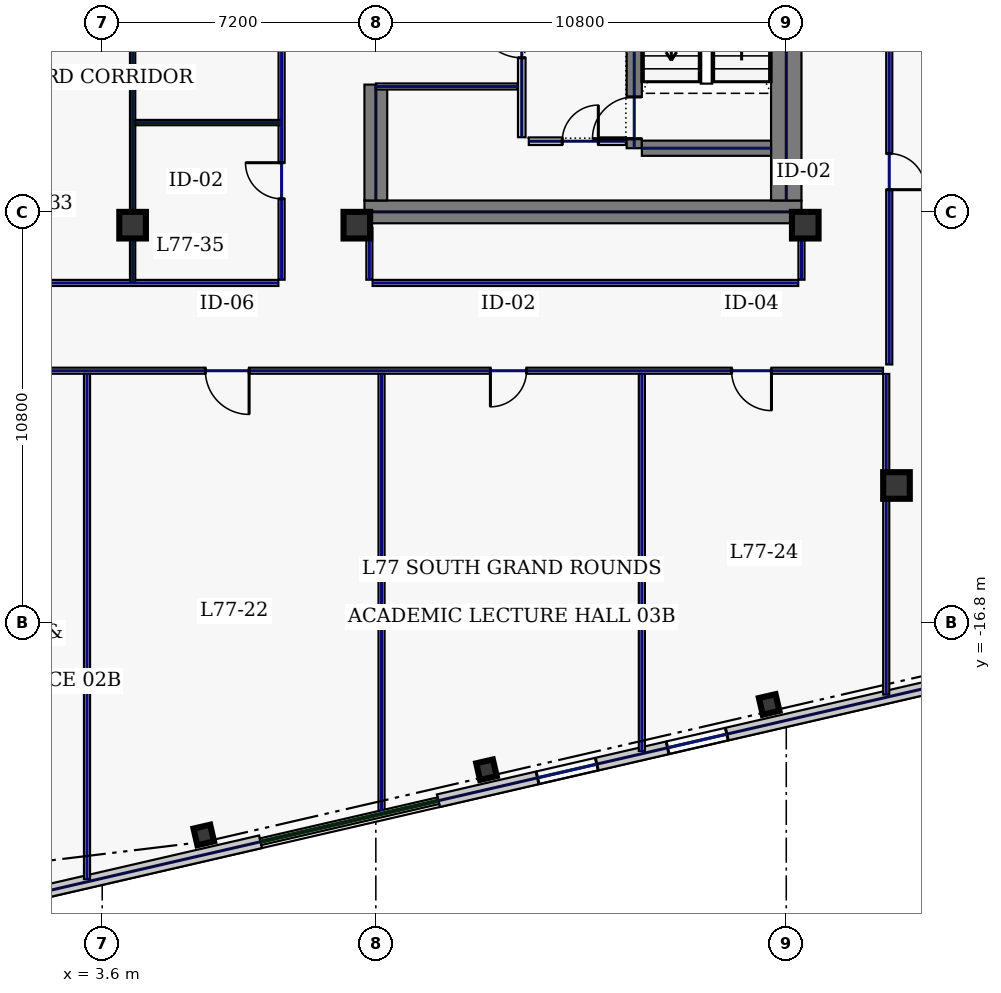
"""IFC4 building model, lengths in metres.
Left out: names, types, materials, properties, quantities, classifications, styles, units other than length and angle.
Written with IfcOpenShell. Run it as: python <this file> out.ifc"""

import sys

from ifc_helpers import new_model, si_unit, direction, frame, frame_2d, origin, origin_2d, place, context, subcontext, project, spatial, rectangle, hollow_rectangle, extrude, element, fill, save


model = new_model("IFC4")
c1 = context("Model", 3, precision=1e-05, world=origin(), true_north=direction((0.0, 1.0)))
c2 = subcontext(c1, "Body", "Model", "MODEL_VIEW")
j1 = project(units=[si_unit("LENGTHUNIT", "METRE"), si_unit("PLANEANGLEUNIT", "RADIAN")], contexts=[c1])
p1 = place(None, origin())
s1 = spatial("IfcSite", under=j1, at=p1, CompositionType="ELEMENT")
p2 = place(p1, origin())
s2 = spatial("IfcBuilding", under=s1, at=p2, CompositionType="ELEMENT")
p3 = place(p2, frame((0.0, 0.0, 329.0)))
s3 = spatial("IfcBuildingStorey", under=s2, at=p3, CompositionType="ELEMENT", Elevation=329.0)
p4 = place(p3, frame((10.5, -6.0, 0.0), z_axis=(0.0, 0.0, 1.0), x_axis=(1.0, 0.0, 0.0)))
e1 = element("IfcWall", 1, at=p4, inside=s3, PredefinedType="SHEAR", context=c2, shape_type="SweptSolid", body=[
    extrude(rectangle(XDim=11.5, YDim=0.6, at=frame_2d((5.75, 0.0))), origin(), (0.0, 0.0, 1.0), 3.68),
])
p5 = place(p3, frame((21.6, -5.7, 0.0), z_axis=(0.0, 0.0, 1.0), x_axis=(0.0, 1.0, 0.0)))
e2 = element("IfcWall", 2, at=p5, inside=s3, PredefinedType="SHEAR", context=c2, shape_type="SweptSolid", body=[
    extrude(rectangle(XDim=11.4, YDim=0.8, at=frame_2d((5.7, 0.0))), origin(), (0.0, 0.0, 1.0), 3.68),
])
p6 = place(p3, frame((10.8, -5.7, 0.0), z_axis=(0.0, 0.0, 1.0), x_axis=(0.0, 1.0, 0.0)))
e3 = element("IfcWall", 3, at=p6, inside=s3, PredefinedType="SHEAR", context=c2, shape_type="SweptSolid", body=[
    extrude(rectangle(XDim=3.05, YDim=0.6, at=frame_2d((1.525, 0.0))), origin(), (0.0, 0.0, 1.0), 3.68),
])
p7 = place(p3, frame((17.6, -4.325, 0.0), z_axis=(0.0, 0.0, 1.0), x_axis=(0.0, 1.0, 0.0)))
e4 = element("IfcWall", 4, at=p7, inside=s3, PredefinedType="SHEAR", context=c2, shape_type="SweptSolid", body=[
    extrude(rectangle(XDim=8.65, YDim=0.4, at=frame_2d((4.325, 0.0))), origin(), (0.0, 0.0, 1.0), 3.68),
])
p8 = place(p7, frame((0.25, 0.0, 0.0)))
e5 = element("IfcOpeningElement", 5, at=p8, cuts=e4, PredefinedType="OPENING", context=c2, shape_type="SweptSolid", body=[
    extrude(rectangle(XDim=1.1, YDim=2.2, at=frame_2d((0.55, 1.1))), frame((0.0, 0.21, 0.0), z_axis=(0.0, -1.0, 0.0), x_axis=(1.0, 0.0, 0.0)), (0.0, 0.0, 1.0), 0.42),
])
p9 = place(p3, frame((17.8, -4.325, 0.0), z_axis=(0.0, 0.0, 1.0), x_axis=(1.0, 0.0, 0.0)))
e6 = element("IfcWall", 6, at=p9, inside=s3, PredefinedType="SHEAR", context=c2, shape_type="SweptSolid", body=[
    extrude(rectangle(XDim=3.4, YDim=0.4, at=frame_2d((1.7, 0.0))), origin(), (0.0, 0.0, 1.0), 3.68),
])
for number, where, z_axis, x_axis in (
    (7, (10.3, -6.35, 0.0), (0.0, 0.0, 1.0), (1.0, 0.0, 0.0)),
    (8, (22.1, -6.35, 0.0), (0.0, 0.0, 1.0), (1.0, 0.0, 0.0)),
    (9, (4.4, -6.35, 0.0), (0.0, 0.0, 1.0), (1.0, 0.0, 0.0)),
    (10, (24.5, -13.2, 0.0), (0.0, 0.0, 1.0), (1.0, 0.0, 0.0)),
):
    element("IfcColumn", number, at=place(p3, frame(where, z_axis=z_axis, x_axis=x_axis)), inside=s3, PredefinedType="COLUMN", context=c2, shape_type="SweptSolid", body=[
        extrude(hollow_rectangle(XDim=0.7, YDim=0.7, WallThickness=0.032, at=origin_2d()), origin(), (0.0, 0.0, 1.0), 3.68),
    ])
for number, where, z_axis, x_axis in (
    (11, (6.273, -22.397, 0.0), (0.0, 0.0, 1.0), (0.974, 0.225, 0.0)),
    (12, (13.711, -20.68, 0.0), (0.0, 0.0, 1.0), (0.974, 0.225, 0.0)),
    (13, (21.15, -18.962, 0.0), (0.0, 0.0, 1.0), (0.974, 0.225, 0.0)),
):
    element("IfcColumn", number, at=place(p3, frame(where, z_axis=z_axis, x_axis=x_axis)), inside=s3, PredefinedType="COLUMN", context=c2, shape_type="SweptSolid", body=[
        extrude(hollow_rectangle(XDim=0.45, YDim=0.45, WallThickness=0.022, at=origin_2d()), origin(), (0.0, 0.0, 1.0), 3.68),
    ])
p10 = place(p3, frame((-2.295, -24.898, 0.0), z_axis=(0.0, 0.0, 1.0), x_axis=(0.974370872906, 0.224947553958, 0.0)))
e14 = element("IfcWall", 14, at=p10, inside=s3, PredefinedType="STANDARD", context=c2, shape_type="SweptSolid", body=[
    extrude(rectangle(XDim=10.328, YDim=0.34, at=frame_2d((5.164, 0.0))), origin(), (0.0, 0.0, 1.0), 3.68),
])
p11 = place(p10, frame((2.605, 0.0, 0.22)))
e15 = element("IfcOpeningElement", 15, at=p11, cuts=e14, PredefinedType="OPENING", context=c2, shape_type="SweptSolid", body=[
    extrude(rectangle(XDim=1.6, YDim=1.2, at=frame_2d((0.8, 0.6))), frame((0.0, 0.18, 0.0), z_axis=(0.0, -1.0, 0.0), x_axis=(1.0, 0.0, 0.0)), (0.0, 0.0, 1.0), 0.36),
])
p12 = place(p3, frame((12.445, -21.495, 0.0), z_axis=(0.0, 0.0, 1.0), x_axis=(0.974369392164, 0.224953967767, 0.0)))
e16 = element("IfcWall", 16, at=p12, inside=s3, PredefinedType="STANDARD", context=c2, shape_type="SweptSolid", body=[
    extrude(rectangle(XDim=17.366, YDim=0.34, at=frame_2d((8.683, 0.0))), origin(), (0.0, 0.0, 1.0), 3.68),
])
p13 = place(p12, frame((2.678, 0.0, 0.22)))
e17 = element("IfcOpeningElement", 17, at=p13, cuts=e16, PredefinedType="OPENING", context=c2, shape_type="SweptSolid", body=[
    extrude(rectangle(XDim=1.6, YDim=1.2, at=frame_2d((0.8, 0.6))), frame((0.0, 0.18, 0.0), z_axis=(0.0, -1.0, 0.0), x_axis=(1.0, 0.0, 0.0)), (0.0, 0.0, 1.0), 0.36),
])
p14 = place(p12, frame((6.19, 0.0, 0.22)))
e18 = element("IfcOpeningElement", 18, at=p14, cuts=e16, PredefinedType="OPENING", context=c2, shape_type="SweptSolid", body=[
    extrude(rectangle(XDim=1.6, YDim=1.2, at=frame_2d((0.8, 0.6))), frame((0.0, 0.18, 0.0), z_axis=(0.0, -1.0, 0.0), x_axis=(1.0, 0.0, 0.0)), (0.0, 0.0, 1.0), 0.36),
])
p15 = place(p12, frame((13.825, 0.0, 0.22)))
e19 = element("IfcOpeningElement", 19, at=p15, cuts=e16, PredefinedType="OPENING", context=c2, shape_type="SweptSolid", body=[
    extrude(rectangle(XDim=1.6, YDim=1.2, at=frame_2d((0.8, 0.6))), frame((0.0, 0.18, 0.0), z_axis=(0.0, -1.0, 0.0), x_axis=(1.0, 0.0, 0.0)), (0.0, 0.0, 1.0), 0.36),
])
p16 = place(p3, frame((32.686, -12.276, 0.0), z_axis=(0.0, 0.0, 1.0), x_axis=(-0.224953091034, 0.974369594576, 0.0)))
e20 = element("IfcWall", 20, at=p16, inside=s3, PredefinedType="STANDARD", context=c2, shape_type="SweptSolid", body=[
    extrude(rectangle(XDim=36.2, YDim=0.34, at=frame_2d((18.1, 0.0))), origin(), (0.0, 0.0, 1.0), 3.68),
])
p17 = place(p16, frame((3.725, 0.0, 0.22)))
e21 = element("IfcOpeningElement", 21, at=p17, cuts=e20, PredefinedType="OPENING", context=c2, shape_type="SweptSolid", body=[
    extrude(rectangle(XDim=1.6, YDim=1.2, at=frame_2d((0.8, 0.6))), frame((0.0, 0.18, 0.0), z_axis=(0.0, -1.0, 0.0), x_axis=(1.0, 0.0, 0.0)), (0.0, 0.0, 1.0), 0.36),
])
p18 = place(p16, frame((21.825, 0.0, 0.22)))
e22 = element("IfcOpeningElement", 22, at=p18, cuts=e20, PredefinedType="OPENING", context=c2, shape_type="SweptSolid", body=[
    extrude(rectangle(XDim=1.6, YDim=1.2, at=frame_2d((0.8, 0.6))), frame((0.0, 0.18, 0.0), z_axis=(0.0, -1.0, 0.0), x_axis=(1.0, 0.0, 0.0)), (0.0, 0.0, 1.0), 0.36),
])
p19 = place(p16, frame((30.875, 0.0, 0.22)))
e23 = element("IfcOpeningElement", 23, at=p19, cuts=e20, PredefinedType="OPENING", context=c2, shape_type="SweptSolid", body=[
    extrude(rectangle(XDim=1.6, YDim=1.2, at=frame_2d((0.8, 0.6))), frame((0.0, 0.18, 0.0), z_axis=(0.0, -1.0, 0.0), x_axis=(1.0, 0.0, 0.0)), (0.0, 0.0, 1.0), 0.36),
])
p20 = place(p3, frame((14.825, -4.14, 0.0), z_axis=(0.0, 0.0, 1.0), x_axis=(1.0, 0.0, 0.0)))
e24 = element("IfcWall", 24, at=p20, inside=s3, PredefinedType="SOLIDWALL", context=c2, shape_type="SweptSolid", body=[
    extrude(rectangle(XDim=2.555, YDim=0.2, at=frame_2d((1.277, 0.0))), origin(), (0.0, 0.0, 1.0), 3.68),
])
p21 = place(p20, frame((0.88, 0.0, 0.0)))
e25 = element("IfcOpeningElement", 25, at=p21, cuts=e24, PredefinedType="OPENING", context=c2, shape_type="SweptSolid", body=[
    extrude(rectangle(XDim=0.95, YDim=2.2, at=frame_2d((0.475, 1.1))), frame((0.0, 0.11, 0.0), z_axis=(0.0, -1.0, 0.0), x_axis=(1.0, 0.0, 0.0)), (0.0, 0.0, 1.0), 0.22),
])
p22 = place(p3, frame((10.8, -2.7, 0.0), z_axis=(0.0, 0.0, 1.0), x_axis=(1.0, 0.0, 0.0)))
e26 = element("IfcWall", 26, at=p22, inside=s3, PredefinedType="PARTITIONING", context=c2, shape_type="SweptSolid", body=[
    extrude(rectangle(XDim=3.735, YDim=0.16, at=frame_2d((1.867, 0.0))), origin(), (0.0, 0.0, 1.0), 3.68),
])
p23 = place(p3, frame((14.64, -4.035, 0.0), z_axis=(0.0, 0.0, 1.0), x_axis=(0.0, 1.0, 0.0)))
e27 = element("IfcWall", 27, at=p23, inside=s3, PredefinedType="SOLIDWALL", context=c2, shape_type="SweptSolid", body=[
    extrude(rectangle(XDim=4.075, YDim=0.2, at=frame_2d((2.038, 0.0))), origin(), (0.0, 0.0, 1.0), 3.68),
])
p24 = place(p23, frame((2.09, 0.0, 0.0)))
e28 = element("IfcOpeningElement", 28, at=p24, cuts=e27, PredefinedType="OPENING", context=c2, shape_type="SweptSolid", body=[
    extrude(rectangle(XDim=1.2, YDim=2.2, at=frame_2d((0.6, 1.1))), frame((0.0, 0.11, 0.0), z_axis=(0.0, -1.0, 0.0), x_axis=(1.0, 0.0, 0.0)), (0.0, 0.0, 1.0), 0.22),
])
p25 = place(p3, frame((24.31, 10.115, 0.0), z_axis=(0.0, 0.0, 1.0), x_axis=(0.0, -1.0, 0.0)))
e29 = element("IfcWall", 29, at=p25, inside=s3, PredefinedType="PARTITIONING", context=c2, shape_type="SweptSolid", body=[
    extrude(rectangle(XDim=20.13, YDim=0.16, at=frame_2d((10.065, 0.0))), origin(), (0.0, 0.0, 1.0), 3.68),
])
p26 = place(p25, frame((14.581, 0.0, 0.0)))
e30 = element("IfcOpeningElement", 30, at=p26, cuts=e29, PredefinedType="OPENING", context=c2, shape_type="SweptSolid", body=[
    extrude(rectangle(XDim=0.95, YDim=2.2, at=frame_2d((0.475, 1.1))), frame((0.0, 0.09, 0.0), z_axis=(0.0, -1.0, 0.0), x_axis=(1.0, 0.0, 0.0)), (0.0, 0.0, 1.0), 0.18),
])
p27 = place(p25, frame((4.819, 0.0, 0.0)))
e31 = element("IfcOpeningElement", 31, at=p27, cuts=e29, PredefinedType="OPENING", context=c2, shape_type="SweptSolid", body=[
    extrude(rectangle(XDim=0.95, YDim=2.2, at=frame_2d((0.475, 1.1))), frame((0.0, 0.09, 0.0), z_axis=(0.0, -1.0, 0.0), x_axis=(1.0, 0.0, 0.0)), (0.0, 0.0, 1.0), 0.18),
])
p28 = place(p3, frame((24.145, -10.18, 0.0), z_axis=(0.0, 0.0, 1.0), x_axis=(-1.0, 0.0, 0.0)))
e32 = element("IfcWall", 32, at=p28, inside=s3, PredefinedType="PARTITIONING", context=c2, shape_type="SweptSolid", body=[
    extrude(rectangle(XDim=36.68, YDim=0.16, at=frame_2d((18.34, 0.0))), origin(), (0.0, 0.0, 1.0), 3.68),
])
p29 = place(p28, frame((32.996, 0.0, 0.0)))
e33 = element("IfcOpeningElement", 33, at=p29, cuts=e32, PredefinedType="OPENING", context=c2, shape_type="SweptSolid", body=[
    extrude(rectangle(XDim=0.95, YDim=2.2, at=frame_2d((0.475, 1.1))), frame((0.0, 0.09, 0.0), z_axis=(0.0, -1.0, 0.0), x_axis=(1.0, 0.0, 0.0)), (0.0, 0.0, 1.0), 0.18),
])
p30 = place(p28, frame((24.68, 0.0, 0.0)))
e34 = element("IfcOpeningElement", 34, at=p30, cuts=e32, PredefinedType="OPENING", context=c2, shape_type="SweptSolid", body=[
    extrude(rectangle(XDim=0.95, YDim=2.2, at=frame_2d((0.475, 1.1))), frame((0.0, 0.09, 0.0), z_axis=(0.0, -1.0, 0.0), x_axis=(1.0, 0.0, 0.0)), (0.0, 0.0, 1.0), 0.18),
])
p31 = place(p28, frame((16.68, 0.0, 0.0)))
e35 = element("IfcOpeningElement", 35, at=p31, cuts=e32, PredefinedType="OPENING", context=c2, shape_type="SweptSolid", body=[
    extrude(rectangle(XDim=1.15, YDim=2.2, at=frame_2d((0.575, 1.1))), frame((0.0, 0.09, 0.0), z_axis=(0.0, -1.0, 0.0), x_axis=(1.0, 0.0, 0.0)), (0.0, 0.0, 1.0), 0.18),
])
p32 = place(p28, frame((9.38, 0.0, 0.0)))
e36 = element("IfcOpeningElement", 36, at=p32, cuts=e32, PredefinedType="OPENING", context=c2, shape_type="SweptSolid", body=[
    extrude(rectangle(XDim=0.95, YDim=2.2, at=frame_2d((0.475, 1.1))), frame((0.0, 0.09, 0.0), z_axis=(0.0, -1.0, 0.0), x_axis=(1.0, 0.0, 0.0)), (0.0, 0.0, 1.0), 0.18),
])
p33 = place(p28, frame((2.934, 0.0, 0.0)))
e37 = element("IfcOpeningElement", 37, at=p33, cuts=e32, PredefinedType="OPENING", context=c2, shape_type="SweptSolid", body=[
    extrude(rectangle(XDim=1.05, YDim=2.2, at=frame_2d((0.525, 1.1))), frame((0.0, 0.09, 0.0), z_axis=(0.0, -1.0, 0.0), x_axis=(1.0, 0.0, 0.0)), (0.0, 0.0, 1.0), 0.18),
])
p34 = place(p3, frame((10.63, -6.42, 0.0), z_axis=(0.0, 0.0, 1.0), x_axis=(0.0, -1.0, 0.0)))
e38 = element("IfcWall", 38, at=p34, inside=s3, PredefinedType="PARTITIONING", context=c2, shape_type="SweptSolid", body=[
    extrude(rectangle(XDim=1.365, YDim=0.16, at=frame_2d((0.683, 0.0))), origin(), (0.0, 0.0, 1.0), 2.075),
])
p35 = place(p3, frame((10.715, -7.87, 0.0), z_axis=(0.0, 0.0, 1.0), x_axis=(1.0, 0.0, 0.0)))
e39 = element("IfcWall", 39, at=p35, inside=s3, PredefinedType="PARTITIONING", context=c2, shape_type="SweptSolid", body=[
    extrude(rectangle(XDim=11.2, YDim=0.16, at=frame_2d((5.6, 0.0))), origin(), (0.0, 0.0, 1.0), 3.68),
])
p36 = place(p3, frame((22.0, -7.785, 0.0), z_axis=(0.0, 0.0, 1.0), x_axis=(0.0, 1.0, 0.0)))
e40 = element("IfcWall", 40, at=p36, inside=s3, PredefinedType="PARTITIONING", context=c2, shape_type="SweptSolid", body=[
    extrude(rectangle(XDim=1.365, YDim=0.16, at=frame_2d((0.683, 0.0))), origin(), (0.0, 0.0, 1.0), 2.075),
])
p37 = place(p3, frame((-1.485, -7.87, 0.0), z_axis=(0.0, 0.0, 1.0), x_axis=(1.0, 0.0, 0.0)))
e41 = element("IfcWall", 41, at=p37, inside=s3, PredefinedType="PARTITIONING", context=c2, shape_type="SweptSolid", body=[
    extrude(rectangle(XDim=9.72, YDim=0.16, at=frame_2d((4.86, 0.0))), origin(), (0.0, 0.0, 1.0), 3.68),
])
p38 = place(p3, frame((8.32, -7.785, 0.0), z_axis=(0.0, 0.0, 1.0), x_axis=(0.0, 1.0, 0.0)))
e42 = element("IfcWall", 42, at=p38, inside=s3, PredefinedType="PARTITIONING", context=c2, shape_type="SweptSolid", body=[
    extrude(rectangle(XDim=15.67, YDim=0.16, at=frame_2d((7.835, 0.0))), origin(), (0.0, 0.0, 1.0), 3.68),
])
p39 = place(p38, frame((2.129, 0.0, 0.0)))
e43 = element("IfcOpeningElement", 43, at=p39, cuts=e42, PredefinedType="OPENING", context=c2, shape_type="SweptSolid", body=[
    extrude(rectangle(XDim=0.95, YDim=2.2, at=frame_2d((0.475, 1.1))), frame((0.0, 0.09, 0.0), z_axis=(0.0, -1.0, 0.0), x_axis=(1.0, 0.0, 0.0)), (0.0, 0.0, 1.0), 0.18),
])
p40 = place(p38, frame((9.361, 0.0, 0.0)))
e44 = element("IfcOpeningElement", 44, at=p40, cuts=e42, PredefinedType="OPENING", context=c2, shape_type="SweptSolid", body=[
    extrude(rectangle(XDim=0.95, YDim=2.2, at=frame_2d((0.475, 1.1))), frame((0.0, 0.09, 0.0), z_axis=(0.0, -1.0, 0.0), x_axis=(1.0, 0.0, 0.0)), (0.0, 0.0, 1.0), 0.18),
])
p41 = place(p3, frame((24.23, -18.703, 0.0), z_axis=(0.0, 0.0, 1.0), x_axis=(0.0, 1.0, 0.0)))
e45 = element("IfcWall", 45, at=p41, inside=s3, PredefinedType="PARTITIONING", context=c2, shape_type="SweptSolid", body=[
    extrude(rectangle(XDim=8.438, YDim=0.16, at=frame_2d((4.219, 0.0))), origin(), (0.0, 0.0, 1.0), 2.075),
])
p42 = place(p3, frame((3.2, -23.558, 0.0), z_axis=(0.0, 0.0, 1.0), x_axis=(0.0, 1.0, 0.0)))
e46 = element("IfcWall", 46, at=p42, inside=s3, PredefinedType="PARTITIONING", context=c2, shape_type="SweptSolid", body=[
    extrude(rectangle(XDim=13.293, YDim=0.16, at=frame_2d((6.646, 0.0))), origin(), (0.0, 0.0, 1.0), 3.68),
])
p43 = place(p3, frame((17.8, -20.187, 0.0), z_axis=(0.0, 0.0, 1.0), x_axis=(0.0, 1.0, 0.0)))
e47 = element("IfcWall", 47, at=p43, inside=s3, PredefinedType="PARTITIONING", context=c2, shape_type="SweptSolid", body=[
    extrude(rectangle(XDim=9.922, YDim=0.16, at=frame_2d((4.961, 0.0))), origin(), (0.0, 0.0, 1.0), 3.68),
])
p44 = place(p3, frame((10.95, -21.769, 0.0), z_axis=(0.0, 0.0, 1.0), x_axis=(0.0, 1.0, 0.0)))
e48 = element("IfcWall", 48, at=p44, inside=s3, PredefinedType="PARTITIONING", context=c2, shape_type="SweptSolid", body=[
    extrude(rectangle(XDim=11.504, YDim=0.16, at=frame_2d((5.752, 0.0))), origin(), (0.0, 0.0, 1.0), 2.075),
])
p45 = place(p3, frame((4.4, -7.865, 0.0), z_axis=(0.0, 0.0, 1.0), x_axis=(0.0, 1.0, 0.0)))
e49 = element("IfcWall", 49, at=p45, inside=s3, PredefinedType="PARTITIONING", context=c2, shape_type="SweptSolid", body=[
    extrude(rectangle(XDim=15.83, YDim=0.14, at=frame_2d((7.915, 0.0))), origin(), (0.0, 0.0, 1.0), 2.675),
])
p46 = place(p3, frame((4.475, -3.65, 0.0), z_axis=(0.0, 0.0, 1.0), x_axis=(1.0, 0.0, 0.0)))
e50 = element("IfcWall", 50, at=p46, inside=s3, PredefinedType="PARTITIONING", context=c2, shape_type="SweptSolid", body=[
    extrude(rectangle(XDim=3.84, YDim=0.14, at=frame_2d((1.92, 0.0))), origin(), (0.0, 0.0, 1.0), 3.68),
])
p47 = place(p13, origin())
e51 = element("IfcWindow", 51, at=p47, inside=s3, PartitioningType="SINGLE_PANEL", PredefinedType="WINDOW", context=c2, shape_type="SweptSolid", body=[
    extrude(rectangle(XDim=1.6, YDim=1.2, at=frame_2d((0.8, 0.6))), frame((0.0, 0.03, 0.0), z_axis=(0.0, -1.0, 0.0), x_axis=(1.0, 0.0, 0.0)), (0.0, 0.0, 1.0), 0.06),
])
fill(e17, e51)
p48 = place(p14, origin())
e52 = element("IfcWindow", 52, at=p48, inside=s3, PartitioningType="SINGLE_PANEL", PredefinedType="WINDOW", context=c2, shape_type="SweptSolid", body=[
    extrude(rectangle(XDim=1.6, YDim=1.2, at=frame_2d((0.8, 0.6))), frame((0.0, 0.03, 0.0), z_axis=(0.0, -1.0, 0.0), x_axis=(1.0, 0.0, 0.0)), (0.0, 0.0, 1.0), 0.06),
])
fill(e18, e52)
p49 = place(p8, origin())
e53 = element("IfcDoor", 53, at=p49, inside=s3, OperationType="SINGLE_SWING_LEFT", PredefinedType="DOOR", context=c2, shape_type="SweptSolid", body=[
    extrude(rectangle(XDim=1.1, YDim=2.2, at=frame_2d((0.55, 1.1))), frame((0.0, 0.025, 0.0), z_axis=(0.0, -1.0, 0.0), x_axis=(1.0, 0.0, 0.0)), (0.0, 0.0, 1.0), 0.05),
])
fill(e5, e53)
p50 = place(p21, origin())
e54 = element("IfcDoor", 54, at=p50, inside=s3, OperationType="SINGLE_SWING_RIGHT", PredefinedType="DOOR", context=c2, shape_type="SweptSolid", body=[
    extrude(rectangle(XDim=0.95, YDim=2.2, at=frame_2d((0.475, 1.1))), frame((0.0, 0.025, 0.0), z_axis=(0.0, -1.0, 0.0), x_axis=(1.0, 0.0, 0.0)), (0.0, 0.0, 1.0), 0.05),
])
fill(e25, e54)
p51 = place(p24, origin())
e55 = element("IfcDoor", 55, at=p51, inside=s3, OperationType="SINGLE_SWING_RIGHT", PredefinedType="DOOR", context=c2, shape_type="SweptSolid", body=[
    extrude(rectangle(XDim=1.2, YDim=2.2, at=frame_2d((0.6, 1.1))), frame((0.0, 0.025, 0.0), z_axis=(0.0, -1.0, 0.0), x_axis=(1.0, 0.0, 0.0)), (0.0, 0.0, 1.0), 0.05),
])
fill(e28, e55)
p52 = place(p31, origin())
e56 = element("IfcDoor", 56, at=p52, inside=s3, OperationType="SINGLE_SWING_LEFT", PredefinedType="DOOR", context=c2, shape_type="SweptSolid", body=[
    extrude(rectangle(XDim=1.15, YDim=2.2, at=frame_2d((0.575, 1.1))), frame((0.0, 0.025, 0.0), z_axis=(0.0, -1.0, 0.0), x_axis=(1.0, 0.0, 0.0)), (0.0, 0.0, 1.0), 0.05),
])
fill(e35, e56)
p53 = place(p32, origin())
e57 = element("IfcDoor", 57, at=p53, inside=s3, OperationType="SINGLE_SWING_RIGHT", PredefinedType="DOOR", context=c2, shape_type="SweptSolid", body=[
    extrude(rectangle(XDim=0.95, YDim=2.2, at=frame_2d((0.475, 1.1))), frame((0.0, 0.025, 0.0), z_axis=(0.0, -1.0, 0.0), x_axis=(1.0, 0.0, 0.0)), (0.0, 0.0, 1.0), 0.05),
])
fill(e36, e57)
p54 = place(p33, origin())
e58 = element("IfcDoor", 58, at=p54, inside=s3, OperationType="SINGLE_SWING_LEFT", PredefinedType="DOOR", context=c2, shape_type="SweptSolid", body=[
    extrude(rectangle(XDim=1.05, YDim=2.2, at=frame_2d((0.525, 1.1))), frame((0.0, 0.025, 0.0), z_axis=(0.0, -1.0, 0.0), x_axis=(1.0, 0.0, 0.0)), (0.0, 0.0, 1.0), 0.05),
])
fill(e37, e58)
p55 = place(p26, origin())
e59 = element("IfcDoor", 59, at=p55, inside=s3, OperationType="SINGLE_SWING_RIGHT", PredefinedType="DOOR", context=c2, shape_type="SweptSolid", body=[
    extrude(rectangle(XDim=0.95, YDim=2.2, at=frame_2d((0.475, 1.1))), frame((0.0, 0.025, 0.0), z_axis=(0.0, -1.0, 0.0), x_axis=(1.0, 0.0, 0.0)), (0.0, 0.0, 1.0), 0.05),
])
fill(e30, e59)
p56 = place(p39, origin())
e60 = element("IfcDoor", 60, at=p56, inside=s3, OperationType="SINGLE_SWING_RIGHT", PredefinedType="DOOR", context=c2, shape_type="SweptSolid", body=[
    extrude(rectangle(XDim=0.95, YDim=2.2, at=frame_2d((0.475, 1.1))), frame((0.0, 0.025, 0.0), z_axis=(0.0, -1.0, 0.0), x_axis=(1.0, 0.0, 0.0)), (0.0, 0.0, 1.0), 0.05),
])
fill(e43, e60)
save(model, sys.argv[1])
